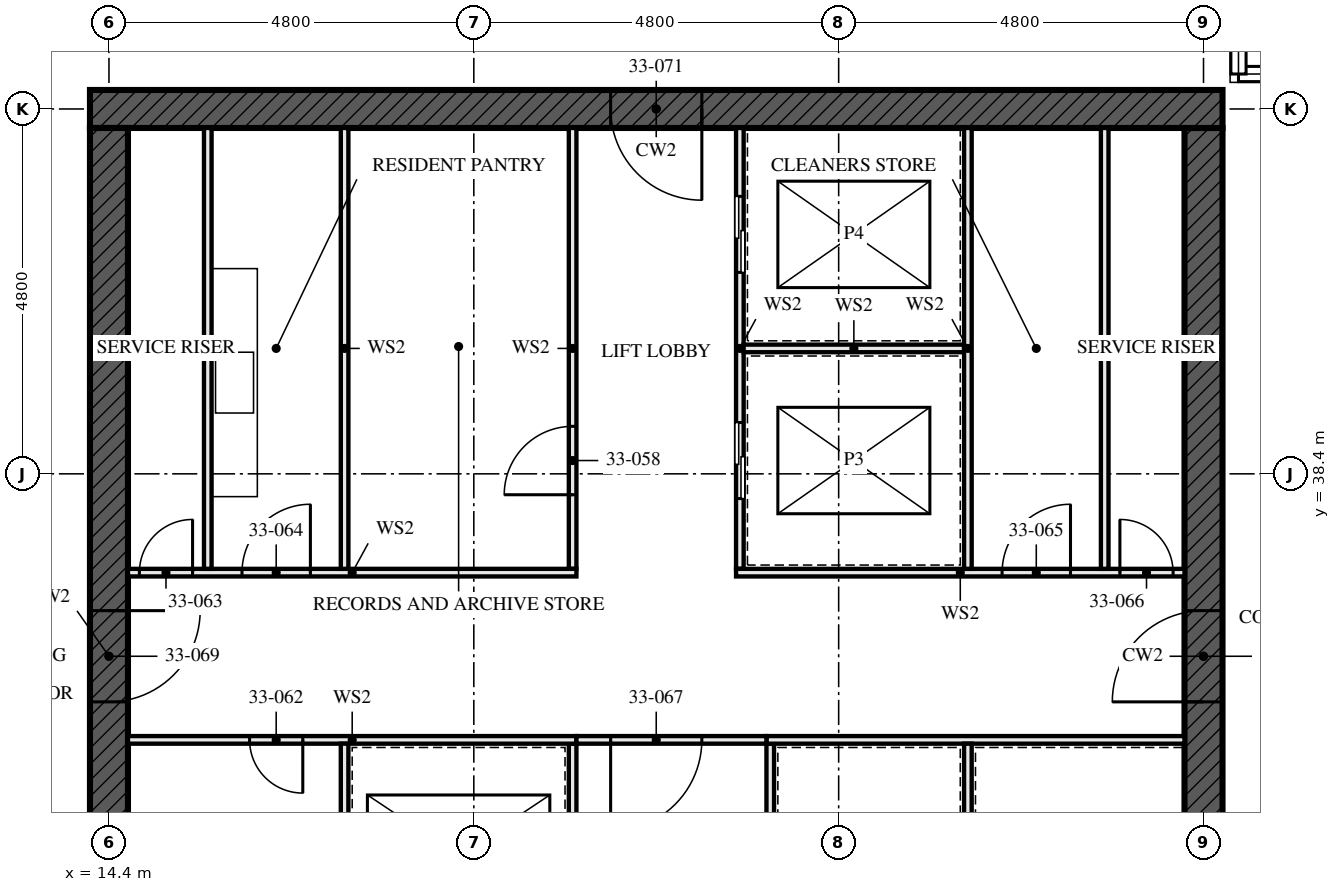
"""IFC4 building model, lengths in metres.
Left out: names, types, materials, properties, quantities, classifications, styles, units other than length and angle.
Written with IfcOpenShell. Run it as: python <this file> out.ifc"""

import sys

from ifc_helpers import new_model, si_unit, direction, frame, frame_2d, origin, place, context, subcontext, project, spatial, rectangle, extrude, element, fill, save


model = new_model("IFC4")
c1 = context("Model", 3, precision=1e-05, world=origin(), true_north=direction((0.0, 1.0)))
c2 = subcontext(c1, "Body", "Model", "MODEL_VIEW")
j1 = project(units=[si_unit("LENGTHUNIT", "METRE"), si_unit("PLANEANGLEUNIT", "RADIAN")], contexts=[c1])
p1 = place(None, origin())
s1 = spatial("IfcSite", under=j1, at=p1, CompositionType="ELEMENT")
p2 = place(p1, origin())
s2 = spatial("IfcBuilding", under=s1, at=p2, CompositionType="ELEMENT")
p3 = place(p2, frame((0.0, 0.0, 122.5)))
s3 = spatial("IfcBuildingStorey", under=s2, at=p3, CompositionType="ELEMENT", Elevation=122.5)
p4 = place(p3, frame((29.05, 43.2, -0.17), z_axis=(0.0, 0.0, 1.0), x_axis=(-1.0, 0.0, 0.0)))
e1 = element("IfcWall", 1, at=p4, inside=s3, PredefinedType="SHEAR", context=c2, shape_type="SweptSolid", body=[
    extrude(rectangle(XDim=14.9, YDim=0.5, at=frame_2d((7.45, 0.0))), origin(), (0.0, 0.0, 1.0), 3.5),
])
p5 = place(p4, frame((6.85, 0.0, 0.17)))
e2 = element("IfcOpeningElement", 2, at=p5, cuts=e1, PredefinedType="OPENING", context=c2, shape_type="SweptSolid", body=[
    extrude(rectangle(XDim=1.2, YDim=2.1, at=frame_2d((0.6, 1.05))), frame((0.0, 0.26, 0.0), z_axis=(0.0, -1.0, 0.0), x_axis=(1.0, 0.0, 0.0)), (0.0, 0.0, 1.0), 0.521),
])
p6 = place(p3, frame((14.4, 42.95, -0.17), z_axis=(0.0, 0.0, 1.0), x_axis=(0.0, -1.0, 0.0)))
e3 = element("IfcWall", 3, at=p6, inside=s3, PredefinedType="SHEAR", context=c2, shape_type="SweptSolid", body=[
    extrude(rectangle(XDim=13.9, YDim=0.5, at=frame_2d((6.95, 0.0))), origin(), (0.0, 0.0, 1.0), 3.5),
])
p7 = place(p6, frame((6.35, 0.0, 0.17)))
e4 = element("IfcOpeningElement", 4, at=p7, cuts=e3, PredefinedType="OPENING", context=c2, shape_type="SweptSolid", body=[
    extrude(rectangle(XDim=1.2, YDim=2.1, at=frame_2d((0.6, 1.05))), frame((0.0, 0.26, 0.0), z_axis=(0.0, -1.0, 0.0), x_axis=(1.0, 0.0, 0.0)), (0.0, 0.0, 1.0), 0.521),
])
p8 = place(p3, frame((28.8, 29.05, -0.17), z_axis=(0.0, 0.0, 1.0), x_axis=(0.0, 1.0, 0.0)))
e5 = element("IfcWall", 5, at=p8, inside=s3, PredefinedType="SHEAR", context=c2, shape_type="SweptSolid", body=[
    extrude(rectangle(XDim=13.9, YDim=0.5, at=frame_2d((6.95, 0.0))), origin(), (0.0, 0.0, 1.0), 3.5),
])
p9 = place(p8, frame((6.35, 0.0, 0.17)))
e6 = element("IfcOpeningElement", 6, at=p9, cuts=e5, PredefinedType="OPENING", context=c2, shape_type="SweptSolid", body=[
    extrude(rectangle(XDim=1.2, YDim=2.1, at=frame_2d((0.6, 1.05))), frame((0.0, 0.26, 0.0), z_axis=(0.0, -1.0, 0.0), x_axis=(1.0, 0.0, 0.0)), (0.0, 0.0, 1.0), 0.521),
])
for number, where, z_axis, x_axis in (
    (7, (15.7, 37.15, 0.0), (0.0, 0.0, 1.0), (0.0, 1.0, 0.0)),
    (8, (27.5, 37.15, 0.0), (0.0, 0.0, 1.0), (0.0, 1.0, 0.0)),
):
    element("IfcWall", number, at=place(p3, frame(where, z_axis=z_axis, x_axis=x_axis)), inside=s3, PredefinedType="SOLIDWALL", context=c2, shape_type="SweptSolid", body=[
        extrude(rectangle(XDim=5.8, YDim=0.1, at=frame_2d((2.9, 0.0))), origin(), (0.0, 0.0, 1.0), 3.33),
    ])
p10 = place(p3, frame((20.5, 29.05, 0.0), z_axis=(0.0, 0.0, 1.0), x_axis=(0.0, 1.0, 0.0)))
e9 = element("IfcWall", 9, at=p10, inside=s3, PredefinedType="SOLIDWALL", context=c2, shape_type="SweptSolid", body=[
    extrude(rectangle(XDim=5.8, YDim=0.1, at=frame_2d((2.9, 0.0))), origin(), (0.0, 0.0, 1.0), 3.33),
])
p11 = place(p10, frame((0.8, 0.0, 0.0)))
e10 = element("IfcOpeningElement", 10, at=p11, cuts=e9, PredefinedType="OPENING", context=c2, shape_type="SweptSolid", body=[
    extrude(rectangle(XDim=1.1, YDim=2.3, at=frame_2d((0.55, 1.15))), frame((0.0, 0.061, 0.0), z_axis=(0.0, -1.0, 0.0), x_axis=(1.0, 0.0, 0.0)), (0.0, 0.0, 1.0), 0.121),
])
p12 = place(p10, frame((3.775, 0.0, 0.0)))
e11 = element("IfcOpeningElement", 11, at=p12, cuts=e9, PredefinedType="OPENING", context=c2, shape_type="SweptSolid", body=[
    extrude(rectangle(XDim=1.1, YDim=2.3, at=frame_2d((0.55, 1.15))), frame((0.0, 0.061, 0.0), z_axis=(0.0, -1.0, 0.0), x_axis=(1.0, 0.0, 0.0)), (0.0, 0.0, 1.0), 0.121),
])
p13 = place(p3, frame((20.5, 37.15, 0.0), z_axis=(0.0, 0.0, 1.0), x_axis=(0.0, 1.0, 0.0)))
e12 = element("IfcWall", 12, at=p13, inside=s3, PredefinedType="SOLIDWALL", context=c2, shape_type="SweptSolid", body=[
    extrude(rectangle(XDim=5.8, YDim=0.1, at=frame_2d((2.9, 0.0))), origin(), (0.0, 0.0, 1.0), 3.33),
])
p14 = place(p13, frame((0.975, 0.0, 0.0)))
e13 = element("IfcOpeningElement", 13, at=p14, cuts=e12, PredefinedType="OPENING", context=c2, shape_type="SweptSolid", body=[
    extrude(rectangle(XDim=0.9, YDim=2.1, at=frame_2d((0.45, 1.05))), frame((0.0, 0.061, 0.0), z_axis=(0.0, -1.0, 0.0), x_axis=(1.0, 0.0, 0.0)), (0.0, 0.0, 1.0), 0.121),
])
p15 = place(p3, frame((22.7, 37.15, 0.0), z_axis=(0.0, 0.0, 1.0), x_axis=(0.0, 1.0, 0.0)))
e14 = element("IfcWall", 14, at=p15, inside=s3, PredefinedType="SOLIDWALL", context=c2, shape_type="SweptSolid", body=[
    extrude(rectangle(XDim=5.8, YDim=0.1, at=frame_2d((2.9, 0.0))), origin(), (0.0, 0.0, 1.0), 3.33),
])
p16 = place(p15, frame((0.925, 0.0, 0.0)))
e15 = element("IfcOpeningElement", 15, at=p16, cuts=e14, PredefinedType="OPENING", context=c2, shape_type="SweptSolid", body=[
    extrude(rectangle(XDim=1.0, YDim=2.1, at=frame_2d((0.5, 1.05))), frame((0.0, 0.061, 0.0), z_axis=(0.0, -1.0, 0.0), x_axis=(1.0, 0.0, 0.0)), (0.0, 0.0, 1.0), 0.121),
])
p17 = place(p15, frame((3.9, 0.0, 0.0)))
e16 = element("IfcOpeningElement", 16, at=p17, cuts=e14, PredefinedType="OPENING", context=c2, shape_type="SweptSolid", body=[
    extrude(rectangle(XDim=1.0, YDim=2.1, at=frame_2d((0.5, 1.05))), frame((0.0, 0.061, 0.0), z_axis=(0.0, -1.0, 0.0), x_axis=(1.0, 0.0, 0.0)), (0.0, 0.0, 1.0), 0.121),
])
p18 = place(p3, frame((23.1, 29.05, 0.0), z_axis=(0.0, 0.0, 1.0), x_axis=(0.0, 1.0, 0.0)))
e17 = element("IfcWall", 17, at=p18, inside=s3, PredefinedType="SOLIDWALL", context=c2, shape_type="SweptSolid", body=[
    extrude(rectangle(XDim=5.8, YDim=0.1, at=frame_2d((2.9, 0.0))), origin(), (0.0, 0.0, 1.0), 3.33),
])
p19 = place(p18, frame((1.0, 0.0, 0.0)))
e18 = element("IfcOpeningElement", 18, at=p19, cuts=e17, PredefinedType="OPENING", context=c2, shape_type="SweptSolid", body=[
    extrude(rectangle(XDim=0.7, YDim=2.1, at=frame_2d((0.35, 1.05))), frame((0.0, 0.061, 0.0), z_axis=(0.0, -1.0, 0.0), x_axis=(1.0, 0.0, 0.0)), (0.0, 0.0, 1.0), 0.121),
])
p20 = place(p3, frame((14.65, 34.9, 0.0), z_axis=(0.0, 0.0, 1.0), x_axis=(1.0, 0.0, 0.0)))
e19 = element("IfcWall", 19, at=p20, inside=s3, PredefinedType="SOLIDWALL", context=c2, shape_type="SweptSolid", body=[
    extrude(rectangle(XDim=5.9, YDim=0.1, at=frame_2d((2.95, 0.0))), origin(), (0.0, 0.0, 1.0), 3.33),
])
p21 = place(p20, frame((1.6, 0.0, 0.0)))
e20 = element("IfcOpeningElement", 20, at=p21, cuts=e19, PredefinedType="OPENING", context=c2, shape_type="SweptSolid", body=[
    extrude(rectangle(XDim=0.7, YDim=2.1, at=frame_2d((0.35, 1.05))), frame((0.0, 0.061, 0.0), z_axis=(0.0, -1.0, 0.0), x_axis=(1.0, 0.0, 0.0)), (0.0, 0.0, 1.0), 0.121),
])
p22 = place(p3, frame((23.05, 34.9, 0.0), z_axis=(0.0, 0.0, 1.0), x_axis=(1.0, 0.0, 0.0)))
e21 = element("IfcWall", 21, at=p22, inside=s3, PredefinedType="SOLIDWALL", context=c2, shape_type="SweptSolid", body=[
    extrude(rectangle(XDim=5.5, YDim=0.1, at=frame_2d((2.75, 0.0))), origin(), (0.0, 0.0, 1.0), 3.33),
])
p23 = place(p3, frame((14.65, 37.1, 0.0), z_axis=(0.0, 0.0, 1.0), x_axis=(1.0, 0.0, 0.0)))
e22 = element("IfcWall", 22, at=p23, inside=s3, PredefinedType="SOLIDWALL", context=c2, shape_type="SweptSolid", body=[
    extrude(rectangle(XDim=5.9, YDim=0.1, at=frame_2d((2.95, 0.0))), origin(), (0.0, 0.0, 1.0), 3.33),
])
p24 = place(p23, frame((0.15, 0.0, 0.0)))
e23 = element("IfcOpeningElement", 23, at=p24, cuts=e22, PredefinedType="OPENING", context=c2, shape_type="SweptSolid", body=[
    extrude(rectangle(XDim=0.7, YDim=2.1, at=frame_2d((0.35, 1.05))), frame((0.0, 0.061, 0.0), z_axis=(0.0, -1.0, 0.0), x_axis=(1.0, 0.0, 0.0)), (0.0, 0.0, 1.0), 0.121),
])
p25 = place(p23, frame((1.5, 0.0, 0.0)))
e24 = element("IfcOpeningElement", 24, at=p25, cuts=e22, PredefinedType="OPENING", context=c2, shape_type="SweptSolid", body=[
    extrude(rectangle(XDim=0.9, YDim=2.1, at=frame_2d((0.45, 1.05))), frame((0.0, 0.061, 0.0), z_axis=(0.0, -1.0, 0.0), x_axis=(1.0, 0.0, 0.0)), (0.0, 0.0, 1.0), 0.121),
])
p26 = place(p3, frame((22.65, 37.1, 0.0), z_axis=(0.0, 0.0, 1.0), x_axis=(1.0, 0.0, 0.0)))
e25 = element("IfcWall", 25, at=p26, inside=s3, PredefinedType="SOLIDWALL", context=c2, shape_type="SweptSolid", body=[
    extrude(rectangle(XDim=5.9, YDim=0.1, at=frame_2d((2.95, 0.0))), origin(), (0.0, 0.0, 1.0), 3.33),
])
p27 = place(p26, frame((3.5, 0.0, 0.0)))
e26 = element("IfcOpeningElement", 26, at=p27, cuts=e25, PredefinedType="OPENING", context=c2, shape_type="SweptSolid", body=[
    extrude(rectangle(XDim=0.9, YDim=2.1, at=frame_2d((0.45, 1.05))), frame((0.0, 0.061, 0.0), z_axis=(0.0, -1.0, 0.0), x_axis=(1.0, 0.0, 0.0)), (0.0, 0.0, 1.0), 0.121),
])
p28 = place(p26, frame((5.05, 0.0, 0.0)))
e27 = element("IfcOpeningElement", 27, at=p28, cuts=e25, PredefinedType="OPENING", context=c2, shape_type="SweptSolid", body=[
    extrude(rectangle(XDim=0.7, YDim=2.1, at=frame_2d((0.35, 1.05))), frame((0.0, 0.061, 0.0), z_axis=(0.0, -1.0, 0.0), x_axis=(1.0, 0.0, 0.0)), (0.0, 0.0, 1.0), 0.121),
])
p29 = place(p3, frame((20.55, 34.9, 0.0), z_axis=(0.0, 0.0, 1.0), x_axis=(1.0, 0.0, 0.0)))
e28 = element("IfcWall", 28, at=p29, inside=s3, PredefinedType="SOLIDWALL", context=c2, shape_type="SweptSolid", body=[
    extrude(rectangle(XDim=2.5, YDim=0.1, at=frame_2d((1.25, 0.0))), origin(), (0.0, 0.0, 1.0), 3.33),
])
p30 = place(p29, frame((0.45, 0.0, 0.0)))
e29 = element("IfcOpeningElement", 29, at=p30, cuts=e28, PredefinedType="OPENING", context=c2, shape_type="SweptSolid", body=[
    extrude(rectangle(XDim=1.2, YDim=2.1, at=frame_2d((0.6, 1.05))), frame((0.0, 0.061, 0.0), z_axis=(0.0, -1.0, 0.0), x_axis=(1.0, 0.0, 0.0)), (0.0, 0.0, 1.0), 0.121),
])
for number, where, z_axis, x_axis in (
    (30, (17.5, 29.05, 0.0), (0.0, 0.0, 1.0), (0.0, 1.0, 0.0)),
    (31, (17.5, 37.15, 0.0), (0.0, 0.0, 1.0), (0.0, 1.0, 0.0)),
):
    element("IfcWall", number, at=place(p3, frame(where, z_axis=z_axis, x_axis=x_axis)), inside=s3, PredefinedType="SOLIDWALL", context=c2, shape_type="SweptSolid", body=[
        extrude(rectangle(XDim=5.8, YDim=0.1, at=frame_2d((2.9, 0.0))), origin(), (0.0, 0.0, 1.0), 3.33),
    ])
p31 = place(p3, frame((22.75, 40.05, 0.0), z_axis=(0.0, 0.0, 1.0), x_axis=(1.0, 0.0, 0.0)))
e32 = element("IfcWall", 32, at=p31, inside=s3, PredefinedType="SOLIDWALL", context=c2, shape_type="SweptSolid", body=[
    extrude(rectangle(XDim=2.9, YDim=0.1, at=frame_2d((1.45, 0.0))), origin(), (0.0, 0.0, 1.0), 3.33),
])
p32 = place(p3, frame((25.7, 37.15, 0.0), z_axis=(0.0, 0.0, 1.0), x_axis=(0.0, 1.0, 0.0)))
e33 = element("IfcWall", 33, at=p32, inside=s3, PredefinedType="SOLIDWALL", context=c2, shape_type="SweptSolid", body=[
    extrude(rectangle(XDim=5.8, YDim=0.1, at=frame_2d((2.9, 0.0))), origin(), (0.0, 0.0, 1.0), 3.33),
])
p33 = place(p3, frame((25.7, 31.95, 0.0), z_axis=(0.0, 0.0, 1.0), x_axis=(0.0, 1.0, 0.0)))
e34 = element("IfcWall", 34, at=p33, inside=s3, PredefinedType="SOLIDWALL", context=c2, shape_type="SweptSolid", body=[
    extrude(rectangle(XDim=2.9, YDim=0.1, at=frame_2d((1.45, 0.0))), origin(), (0.0, 0.0, 1.0), 3.33),
])
p34 = place(p14, origin())
e35 = element("IfcDoor", 35, at=p34, inside=s3, OperationType="SINGLE_SWING_RIGHT", PredefinedType="DOOR", context=c2, shape_type="SweptSolid", body=[
    extrude(rectangle(XDim=0.9, YDim=2.1, at=frame_2d((0.45, 1.05))), frame((0.0, 0.027, 0.0), z_axis=(0.0, -1.0, 0.0), x_axis=(1.0, 0.0, 0.0)), (0.0, 0.0, 1.0), 0.054),
])
fill(e13, e35)
p35 = place(p16, origin())
e36 = element("IfcDoor", 36, at=p35, inside=s3, OperationType="SLIDING_TO_LEFT", PredefinedType="DOOR", context=c2, shape_type="SweptSolid", body=[
    extrude(rectangle(XDim=1.0, YDim=2.1, at=frame_2d((0.5, 1.05))), frame((0.0, 0.05, 0.0), z_axis=(0.0, -1.0, 0.0), x_axis=(1.0, 0.0, 0.0)), (0.0, 0.0, 1.0), 0.1),
])
fill(e15, e36)
p36 = place(p17, origin())
e37 = element("IfcDoor", 37, at=p36, inside=s3, OperationType="SLIDING_TO_LEFT", PredefinedType="DOOR", context=c2, shape_type="SweptSolid", body=[
    extrude(rectangle(XDim=1.0, YDim=2.1, at=frame_2d((0.5, 1.05))), frame((0.0, 0.05, 0.0), z_axis=(0.0, -1.0, 0.0), x_axis=(1.0, 0.0, 0.0)), (0.0, 0.0, 1.0), 0.1),
])
fill(e16, e37)
p37 = place(p21, frame((0.7, 0.0, 0.0), z_axis=(0.0, 0.0, 1.0), x_axis=(-1.0, 0.0, 0.0)))
e38 = element("IfcDoor", 38, at=p37, inside=s3, OperationType="SINGLE_SWING_RIGHT", PredefinedType="DOOR", context=c2, shape_type="SweptSolid", body=[
    extrude(rectangle(XDim=0.7, YDim=2.1, at=frame_2d((0.35, 1.05))), frame((0.0, 0.027, 0.0), z_axis=(0.0, -1.0, 0.0), x_axis=(1.0, 0.0, 0.0)), (0.0, 0.0, 1.0), 0.054),
])
fill(e20, e38)
p38 = place(p24, origin())
e39 = element("IfcDoor", 39, at=p38, inside=s3, OperationType="SINGLE_SWING_LEFT", PredefinedType="DOOR", context=c2, shape_type="SweptSolid", body=[
    extrude(rectangle(XDim=0.7, YDim=2.1, at=frame_2d((0.35, 1.05))), frame((0.0, 0.027, 0.0), z_axis=(0.0, -1.0, 0.0), x_axis=(1.0, 0.0, 0.0)), (0.0, 0.0, 1.0), 0.054),
])
fill(e23, e39)
p39 = place(p25, origin())
e40 = element("IfcDoor", 40, at=p39, inside=s3, OperationType="SINGLE_SWING_LEFT", PredefinedType="DOOR", context=c2, shape_type="SweptSolid", body=[
    extrude(rectangle(XDim=0.9, YDim=2.1, at=frame_2d((0.45, 1.05))), frame((0.0, 0.027, 0.0), z_axis=(0.0, -1.0, 0.0), x_axis=(1.0, 0.0, 0.0)), (0.0, 0.0, 1.0), 0.054),
])
fill(e24, e40)
p40 = place(p27, origin())
e41 = element("IfcDoor", 41, at=p40, inside=s3, OperationType="SINGLE_SWING_LEFT", PredefinedType="DOOR", context=c2, shape_type="SweptSolid", body=[
    extrude(rectangle(XDim=0.9, YDim=2.1, at=frame_2d((0.45, 1.05))), frame((0.0, 0.027, 0.0), z_axis=(0.0, -1.0, 0.0), x_axis=(1.0, 0.0, 0.0)), (0.0, 0.0, 1.0), 0.054),
])
fill(e26, e41)
p41 = place(p28, origin())
e42 = element("IfcDoor", 42, at=p41, inside=s3, OperationType="SINGLE_SWING_RIGHT", PredefinedType="DOOR", context=c2, shape_type="SweptSolid", body=[
    extrude(rectangle(XDim=0.7, YDim=2.1, at=frame_2d((0.35, 1.05))), frame((0.0, 0.027, 0.0), z_axis=(0.0, -1.0, 0.0), x_axis=(1.0, 0.0, 0.0)), (0.0, 0.0, 1.0), 0.054),
])
fill(e27, e42)
p42 = place(p30, frame((1.2, 0.0, 0.0), z_axis=(0.0, 0.0, 1.0), x_axis=(-1.0, 0.0, 0.0)))
e43 = element("IfcDoor", 43, at=p42, inside=s3, OperationType="SINGLE_SWING_LEFT", PredefinedType="DOOR", context=c2, shape_type="SweptSolid", body=[
    extrude(rectangle(XDim=1.2, YDim=2.1, at=frame_2d((0.6, 1.05))), frame((0.0, 0.027, 0.0), z_axis=(0.0, -1.0, 0.0), x_axis=(1.0, 0.0, 0.0)), (0.0, 0.0, 1.0), 0.054),
])
fill(e29, e43)
p43 = place(p7, origin())
e44 = element("IfcDoor", 44, at=p43, inside=s3, OperationType="SINGLE_SWING_LEFT", PredefinedType="DOOR", context=c2, shape_type="SweptSolid", body=[
    extrude(rectangle(XDim=1.2, YDim=2.1, at=frame_2d((0.6, 1.05))), frame((0.0, 0.027, 0.0), z_axis=(0.0, -1.0, 0.0), x_axis=(1.0, 0.0, 0.0)), (0.0, 0.0, 1.0), 0.054),
])
fill(e4, e44)
p44 = place(p9, origin())
e45 = element("IfcDoor", 45, at=p44, inside=s3, OperationType="SINGLE_SWING_LEFT", PredefinedType="DOOR", context=c2, shape_type="SweptSolid", body=[
    extrude(rectangle(XDim=1.2, YDim=2.1, at=frame_2d((0.6, 1.05))), frame((0.0, 0.027, 0.0), z_axis=(0.0, -1.0, 0.0), x_axis=(1.0, 0.0, 0.0)), (0.0, 0.0, 1.0), 0.054),
])
fill(e6, e45)
p45 = place(p5, origin())
e46 = element("IfcDoor", 46, at=p45, inside=s3, OperationType="SINGLE_SWING_LEFT", PredefinedType="DOOR", context=c2, shape_type="SweptSolid", body=[
    extrude(rectangle(XDim=1.2, YDim=2.1, at=frame_2d((0.6, 1.05))), frame((0.0, 0.027, 0.0), z_axis=(0.0, -1.0, 0.0), x_axis=(1.0, 0.0, 0.0)), (0.0, 0.0, 1.0), 0.054),
])
fill(e2, e46)
save(model, sys.argv[1])
